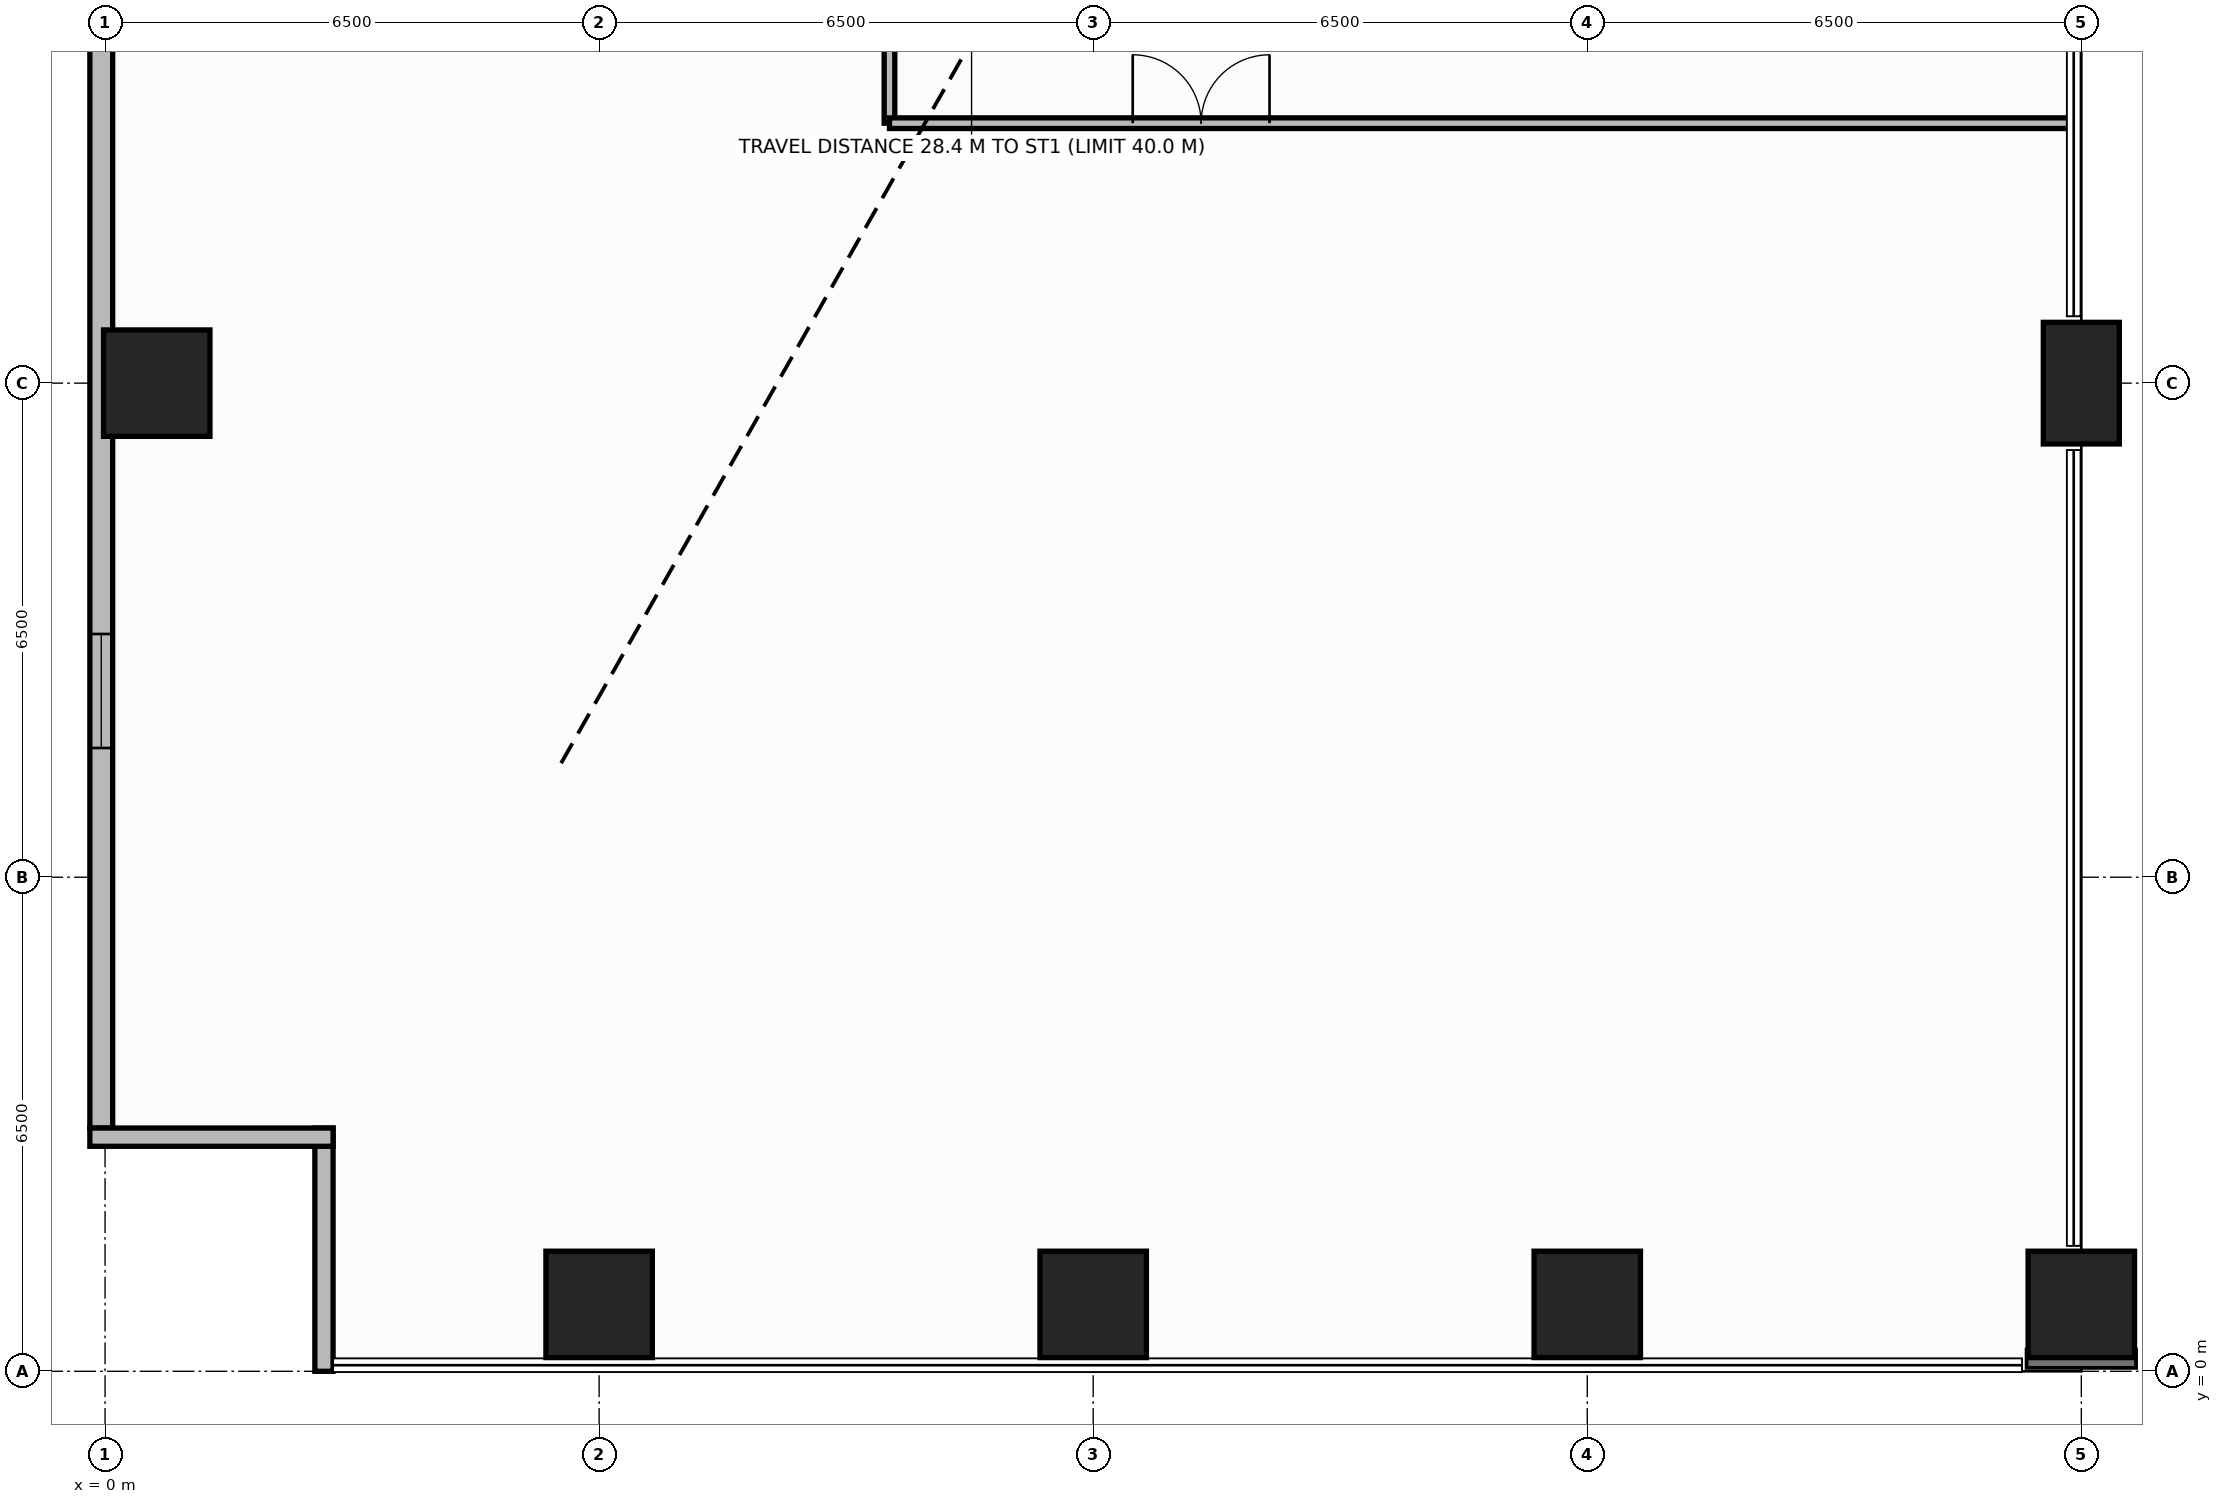
"""IFC4 building model, lengths in metres.
Left out: names, types, materials, properties, quantities, classifications, styles, units other than length and angle.
Written with IfcOpenShell. Run it as: python <this file> out.ifc"""

import sys

from ifc_helpers import new_model, si_unit, direction, frame, frame_2d, origin, origin_2d, place, context, subcontext, project, spatial, rectangle, extrude, element, fill, save


model = new_model("IFC4")
c1 = context("Model", 3, precision=1e-05, world=origin(), true_north=direction((0.0, 1.0)))
c2 = subcontext(c1, "Body", "Model", "MODEL_VIEW")
j1 = project(units=[si_unit("LENGTHUNIT", "METRE"), si_unit("PLANEANGLEUNIT", "RADIAN")], contexts=[c1])
p1 = place(None, origin())
s1 = spatial("IfcSite", under=j1, at=p1, CompositionType="ELEMENT")
p2 = place(p1, origin())
s2 = spatial("IfcBuilding", under=s1, at=p2, CompositionType="ELEMENT")
p3 = place(p2, frame((0.0, 0.0, 11.5)))
s3 = spatial("IfcBuildingStorey", under=s2, at=p3, CompositionType="ELEMENT", Elevation=11.5)
p4 = place(p3, frame((26.0, 13.0, 0.0), z_axis=(0.0, 0.0, 1.0), x_axis=(1.0, 0.0, 0.0)))
e1 = element("IfcColumn", 1, at=p4, inside=s3, PredefinedType="PILASTER", context=c2, shape_type="SweptSolid", body=[
    extrude(rectangle(XDim=1.0, YDim=1.6, at=origin_2d()), origin(), (0.0, 0.0, 1.0), 5.5),
])
for number, where, z_axis, x_axis in (
    (2, (6.5, 0.88, 0.0), (0.0, 0.0, 1.0), (1.0, 0.0, 0.0)),
    (3, (13.0, 0.88, 0.0), (0.0, 0.0, 1.0), (1.0, 0.0, 0.0)),
    (4, (19.5, 0.88, 0.0), (0.0, 0.0, 1.0), (1.0, 0.0, 0.0)),
    (5, (26.0, 0.88, 0.0), (0.0, 0.0, 1.0), (1.0, 0.0, 0.0)),
    (6, (0.68, 13.0, 0.0), (0.0, 0.0, 1.0), (1.0, 0.0, 0.0)),
):
    element("IfcColumn", number, at=place(p3, frame(where, z_axis=z_axis, x_axis=x_axis)), inside=s3, PredefinedType="COLUMN", context=c2, shape_type="SweptSolid", body=[
        extrude(rectangle(XDim=1.4, YDim=1.4, at=origin_2d()), origin(), (0.0, 0.0, 1.0), 5.5),
    ])
p5 = place(p3, frame((-0.05, 3.2, 0.0), z_axis=(0.0, 0.0, 1.0), x_axis=(0.0, 1.0, 0.0)))
e7 = element("IfcWall", 7, at=p5, inside=s3, PredefinedType="STANDARD", context=c2, shape_type="SweptSolid", body=[
    extrude(rectangle(XDim=45.6, YDim=0.3, at=frame_2d((22.8, 0.0))), origin(), (0.0, 0.0, 1.0), 5.22),
])
p6 = place(p5, frame((5.0, 0.0, 0.9)))
e8 = element("IfcOpeningElement", 8, at=p6, cuts=e7, PredefinedType="OPENING", context=c2, shape_type="SweptSolid", body=[
    extrude(rectangle(XDim=1.5, YDim=2.2, at=frame_2d((0.75, 1.1))), frame((0.0, 0.16, 0.0), z_axis=(0.0, -1.0, 0.0), x_axis=(1.0, 0.0, 0.0)), (0.0, 0.0, 1.0), 0.32),
])
p7 = place(p5, frame((14.5, 0.0, 0.9)))
e9 = element("IfcOpeningElement", 9, at=p7, cuts=e7, PredefinedType="OPENING", context=c2, shape_type="SweptSolid", body=[
    extrude(rectangle(XDim=1.5, YDim=2.2, at=frame_2d((0.75, 1.1))), frame((0.0, 0.16, 0.0), z_axis=(0.0, -1.0, 0.0), x_axis=(1.0, 0.0, 0.0)), (0.0, 0.0, 1.0), 0.32),
])
p8 = place(p5, frame((25.5, 0.0, 0.9)))
e10 = element("IfcOpeningElement", 10, at=p8, cuts=e7, PredefinedType="OPENING", context=c2, shape_type="SweptSolid", body=[
    extrude(rectangle(XDim=1.5, YDim=2.2, at=frame_2d((0.75, 1.1))), frame((0.0, 0.16, 0.0), z_axis=(0.0, -1.0, 0.0), x_axis=(1.0, 0.0, 0.0)), (0.0, 0.0, 1.0), 0.32),
])
p9 = place(p5, frame((35.0, 0.0, 0.9)))
e11 = element("IfcOpeningElement", 11, at=p9, cuts=e7, PredefinedType="OPENING", context=c2, shape_type="SweptSolid", body=[
    extrude(rectangle(XDim=1.5, YDim=2.2, at=frame_2d((0.75, 1.1))), frame((0.0, 0.16, 0.0), z_axis=(0.0, -1.0, 0.0), x_axis=(1.0, 0.0, 0.0)), (0.0, 0.0, 1.0), 0.32),
])
for number, where, z_axis, x_axis in (
    (12, (2.88, 0.0, 0.0), (0.0, 0.0, 1.0), (0.0, 1.0, 0.0)),
    (13, (3.0, 3.08, 0.0), (0.0, 0.0, 1.0), (-1.0, 0.0, 0.0)),
):
    element("IfcWall", number, at=place(p3, frame(where, z_axis=z_axis, x_axis=x_axis)), inside=s3, PredefinedType="STANDARD", context=c2, shape_type="SweptSolid", body=[
        extrude(rectangle(XDim=3.2, YDim=0.24, at=frame_2d((1.6, 0.0))), origin(), (0.0, 0.0, 1.0), 5.22),
    ])
p10 = place(p3, frame((10.32, 16.42, 0.0), z_axis=(0.0, 0.0, 1.0), x_axis=(0.0, 1.0, 0.0)))
e14 = element("IfcWall", 14, at=p10, inside=s3, PredefinedType="PARTITIONING", context=c2, shape_type="SweptSolid", body=[
    extrude(rectangle(XDim=2.18, YDim=0.14, at=frame_2d((1.09, 0.0))), origin(), (0.0, 0.0, 1.0), 5.22),
])
p11 = place(p3, frame((10.32, 16.42, 0.0), z_axis=(0.0, 0.0, 1.0), x_axis=(1.0, 0.0, 0.0)))
e15 = element("IfcWall", 15, at=p11, inside=s3, PredefinedType="PARTITIONING", context=c2, shape_type="SweptSolid", body=[
    extrude(rectangle(XDim=15.6, YDim=0.14, at=frame_2d((7.8, 0.0))), origin(), (0.0, 0.0, 1.0), 5.22),
])
p12 = place(p11, frame((3.2, 0.0, 0.0)))
e16 = element("IfcOpeningElement", 16, at=p12, cuts=e15, PredefinedType="OPENING", context=c2, shape_type="SweptSolid", body=[
    extrude(rectangle(XDim=1.8, YDim=2.2, at=frame_2d((0.9, 1.1))), frame((0.0, 0.08, 0.0), z_axis=(0.0, -1.0, 0.0), x_axis=(1.0, 0.0, 0.0)), (0.0, 0.0, 1.0), 0.16),
])
p13 = place(p6, origin())
e17 = element("IfcWindow", 17, at=p13, inside=s3, PartitioningType="SINGLE_PANEL", PredefinedType="WINDOW", context=c2, shape_type="SweptSolid", body=[
    extrude(rectangle(XDim=1.5, YDim=2.2, at=frame_2d((0.75, 1.1))), frame((0.0, 0.03, 0.0), z_axis=(0.0, -1.0, 0.0), x_axis=(1.0, 0.0, 0.0)), (0.0, 0.0, 1.0), 0.06),
])
fill(e8, e17)
p14 = place(p12, origin())
e18 = element("IfcDoor", 18, at=p14, inside=s3, OperationType="DOUBLE_DOOR_SINGLE_SWING", PredefinedType="DOOR", context=c2, shape_type="SweptSolid", body=[
    extrude(rectangle(XDim=1.8, YDim=2.2, at=frame_2d((0.9, 1.1))), frame((0.0, 0.025, 0.0), z_axis=(0.0, -1.0, 0.0), x_axis=(1.0, 0.0, 0.0)), (0.0, 0.0, 1.0), 0.05),
])
fill(e16, e18)
save(model, sys.argv[1])
